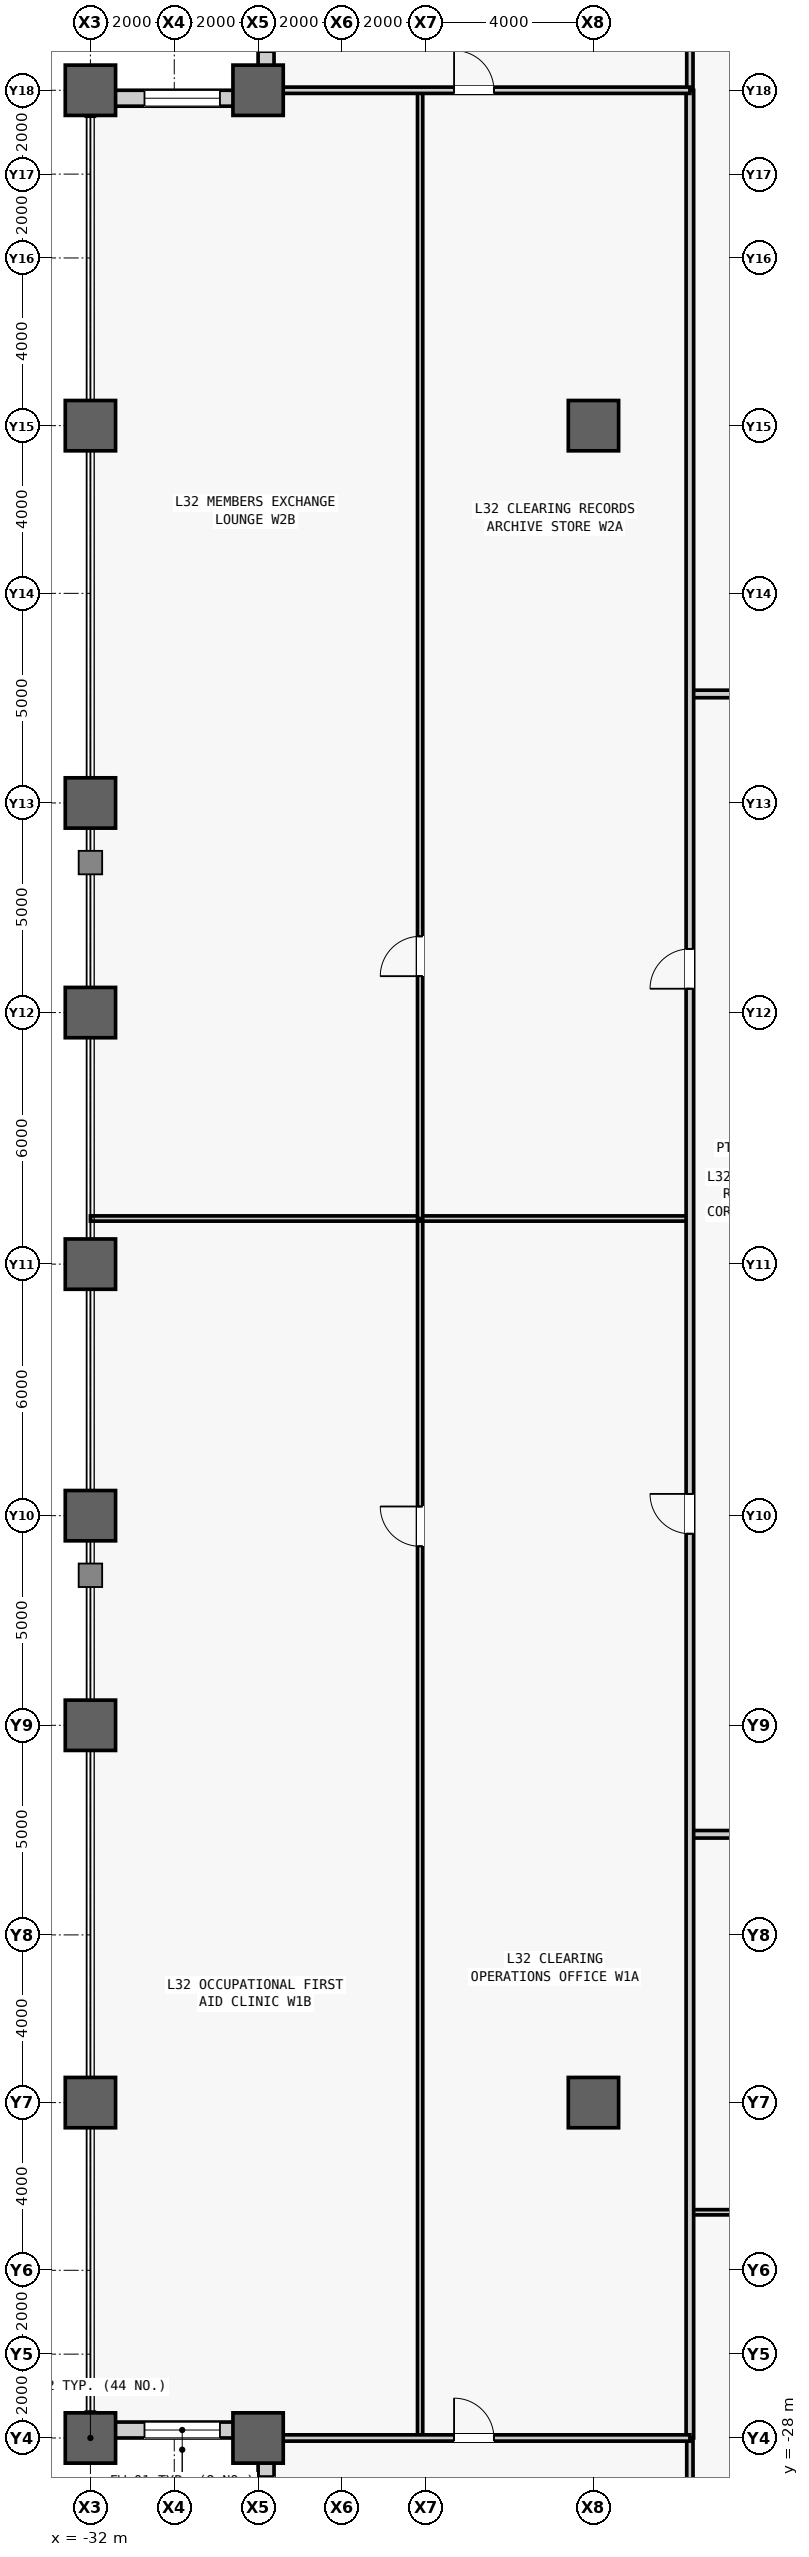
"""IFC4 building model, lengths in metres.
Left out: names, types, materials, properties, quantities, classifications, styles, units other than length and angle.
Written with IfcOpenShell. Run it as: python <this file> out.ifc"""

import sys

from ifc_helpers import new_model, si_unit, direction, frame, frame_2d, origin, origin_2d, place, context, subcontext, project, spatial, rectangle, hollow_rectangle, extrude, source, transform, mapped, element, fill, save


model = new_model("IFC4")
c1 = context("Model", 3, precision=1e-05, world=origin(), true_north=direction((0.0, 1.0)))
c2 = subcontext(c1, "Body", "Model", "MODEL_VIEW")
j1 = project(units=[si_unit("LENGTHUNIT", "METRE"), si_unit("PLANEANGLEUNIT", "RADIAN")], contexts=[c1])
p1 = place(None, origin())
s1 = spatial("IfcSite", under=j1, at=p1, CompositionType="ELEMENT")
p2 = place(p1, origin())
s2 = spatial("IfcBuilding", under=s1, at=p2, CompositionType="ELEMENT")
p3 = place(p2, frame((0.0, 0.0, 140.6)))
s3 = spatial("IfcBuildingStorey", under=s2, at=p3, CompositionType="ELEMENT", Elevation=140.6)
m1 = source(origin(), c2, "Body", "SweptSolid", [
    extrude(hollow_rectangle(XDim=1.2, YDim=1.2, WallThickness=0.07, at=origin_2d()), origin(), (0.0, 0.0, 1.0), 4.1),
])
for number, where, z_axis, x_axis in (
    (1, (-32.0, -28.0, 0.0), (0.0, 0.0, 1.0), (1.0, 0.0, 0.0)),
    (2, (-32.0, -20.0, 0.0), (0.0, 0.0, 1.0), (1.0, 0.0, 0.0)),
    (3, (-32.0, -11.0, 0.0), (0.0, 0.0, 1.0), (1.0, 0.0, 0.0)),
    (4, (-32.0, -6.0, 0.0), (0.0, 0.0, 1.0), (1.0, 0.0, 0.0)),
    (5, (-32.0, 0.0, 0.0), (0.0, 0.0, 1.0), (1.0, 0.0, 0.0)),
    (6, (-32.0, 6.0, 0.0), (0.0, 0.0, 1.0), (1.0, 0.0, 0.0)),
    (7, (-32.0, 11.0, 0.0), (0.0, 0.0, 1.0), (1.0, 0.0, 0.0)),
    (8, (-32.0, 20.0, 0.0), (0.0, 0.0, 1.0), (1.0, 0.0, 0.0)),
    (9, (-32.0, 28.0, 0.0), (0.0, 0.0, 1.0), (1.0, 0.0, 0.0)),
    (10, (-28.0, -28.0, 0.0), (0.0, 0.0, 1.0), (1.0, 0.0, 0.0)),
    (11, (-28.0, 28.0, 0.0), (0.0, 0.0, 1.0), (1.0, 0.0, 0.0)),
    (12, (-20.0, -20.0, 0.0), (0.0, 0.0, 1.0), (1.0, 0.0, 0.0)),
    (13, (-20.0, 20.0, 0.0), (0.0, 0.0, 1.0), (1.0, 0.0, 0.0)),
):
    element("IfcColumn", number, at=place(p3, frame(where, z_axis=z_axis, x_axis=x_axis)), inside=s3, PredefinedType="COLUMN", context=c2, shape_type="MappedRepresentation", body=[
        mapped(m1, transform((0.0, 0.0, 0.0), scale=1.0)),
    ])
m2 = source(origin(), c2, "Body", "SweptSolid", [
    extrude(rectangle(XDim=3.62, YDim=0.38, at=frame_2d((1.81, 0.0))), origin(), (0.0, 0.0, 1.0), 3.145),
])
p4 = place(p3, frame((-28.0, -27.81, 0.0), z_axis=(0.0, 0.0, 1.0), x_axis=(-1.0, 0.0, 0.0)))
e14 = element("IfcWall", 14, at=p4, inside=s3, PredefinedType="STANDARD", context=c2, shape_type="MappedRepresentation", body=[
    mapped(m2, transform((0.0, 0.0, 0.0), scale=1.0)),
])
m3 = source(origin(), c2, "Body", "SweptSolid", [
    extrude(rectangle(XDim=1.8, YDim=2.4, at=frame_2d((0.9, 1.2))), frame((0.0, 0.2, 0.0), z_axis=(0.0, -1.0, 0.0), x_axis=(1.0, 0.0, 0.0)), (0.0, 0.0, 1.0), 0.4),
])
p5 = place(p4, frame((0.91, 0.0, 0.5)))
e15 = element("IfcOpeningElement", 15, at=p5, cuts=e14, PredefinedType="OPENING", context=c2, shape_type="MappedRepresentation", body=[
    mapped(m3, transform((0.0, 0.0, 0.0), scale=1.0)),
])
p6 = place(p3, frame((-27.81, -31.62, 0.0), z_axis=(0.0, 0.0, 1.0), x_axis=(0.0, 1.0, 0.0)))
e16 = element("IfcWall", 16, at=p6, inside=s3, PredefinedType="STANDARD", context=c2, shape_type="MappedRepresentation", body=[
    mapped(m2, transform((0.0, 0.0, 0.0), scale=1.0)),
])
p7 = place(p6, frame((0.91, 0.0, 0.5)))
e17 = element("IfcOpeningElement", 17, at=p7, cuts=e16, PredefinedType="OPENING", context=c2, shape_type="MappedRepresentation", body=[
    mapped(m3, transform((0.0, 0.0, 0.0), scale=1.0)),
])
p8 = place(p3, frame((-27.81, 28.0, 0.0), z_axis=(0.0, 0.0, 1.0), x_axis=(0.0, 1.0, 0.0)))
e18 = element("IfcWall", 18, at=p8, inside=s3, PredefinedType="STANDARD", context=c2, shape_type="MappedRepresentation", body=[
    mapped(m2, transform((0.0, 0.0, 0.0), scale=1.0)),
])
p9 = place(p8, frame((0.91, 0.0, 0.5)))
e19 = element("IfcOpeningElement", 19, at=p9, cuts=e18, PredefinedType="OPENING", context=c2, shape_type="MappedRepresentation", body=[
    mapped(m3, transform((0.0, 0.0, 0.0), scale=1.0)),
])
p10 = place(p3, frame((-28.0, 27.81, 0.0), z_axis=(0.0, 0.0, 1.0), x_axis=(-1.0, 0.0, 0.0)))
e20 = element("IfcWall", 20, at=p10, inside=s3, PredefinedType="STANDARD", context=c2, shape_type="MappedRepresentation", body=[
    mapped(m2, transform((0.0, 0.0, 0.0), scale=1.0)),
])
p11 = place(p10, frame((0.91, 0.0, 0.5)))
e21 = element("IfcOpeningElement", 21, at=p11, cuts=e20, PredefinedType="OPENING", context=c2, shape_type="MappedRepresentation", body=[
    mapped(m3, transform((0.0, 0.0, 0.0), scale=1.0)),
])
m4 = source(origin(), c2, "Body", "SweptSolid", [
    extrude(rectangle(XDim=15.95, YDim=0.125, at=frame_2d((7.975, 0.0))), origin(), (0.0, 0.0, 1.0), 3.84),
])
p12 = place(p3, frame((-17.7, -22.616, 0.0), z_axis=(0.0, 0.0, 1.0), x_axis=(1.0, 0.0, 0.0)))
e22 = element("IfcWall", 22, at=p12, inside=s3, PredefinedType="PARTITIONING", context=c2, shape_type="MappedRepresentation", body=[
    mapped(m4, transform((0.0, 0.0, 0.0), scale=1.0)),
])
m5 = source(origin(), c2, "Body", "SweptSolid", [
    extrude(rectangle(XDim=0.95, YDim=2.15, at=frame_2d((0.475, 1.075))), frame((0.0, 0.073, 0.0), z_axis=(0.0, -1.0, 0.0), x_axis=(1.0, 0.0, 0.0)), (0.0, 0.0, 1.0), 0.145),
])
p13 = place(p12, frame((7.5, 0.0, 0.0)))
e23 = element("IfcOpeningElement", 23, at=p13, cuts=e22, PredefinedType="OPENING", context=c2, shape_type="MappedRepresentation", body=[
    mapped(m5, transform((0.0, 0.0, 0.0), scale=1.0)),
])
m6 = source(origin(), c2, "Body", "SweptSolid", [
    extrude(rectangle(XDim=36.25, YDim=0.18, at=frame_2d((18.125, 0.0))), origin(), (0.0, 0.0, 1.0), 3.84),
])
p14 = place(p3, frame((-17.7, -13.6, 0.0), z_axis=(0.0, 0.0, 1.0), x_axis=(1.0, 0.0, 0.0)))
e24 = element("IfcWall", 24, at=p14, inside=s3, PredefinedType="PARTITIONING", context=c2, shape_type="MappedRepresentation", body=[
    mapped(m6, transform((0.0, 0.0, 0.0), scale=1.0)),
])
m7 = source(origin(), c2, "Body", "SweptSolid", [
    extrude(rectangle(XDim=1.05, YDim=2.2, at=frame_2d((0.525, 1.1))), frame((0.0, 0.1, 0.0), z_axis=(0.0, -1.0, 0.0), x_axis=(1.0, 0.0, 0.0)), (0.0, 0.0, 1.0), 0.2),
])
p15 = place(p14, frame((9.1, 0.0, 0.0)))
e25 = element("IfcOpeningElement", 25, at=p15, cuts=e24, PredefinedType="OPENING", context=c2, shape_type="MappedRepresentation", body=[
    mapped(m7, transform((0.0, 0.0, 0.0), scale=1.0)),
])
p16 = place(p14, frame((23.5, 0.0, 0.0)))
e26 = element("IfcOpeningElement", 26, at=p16, cuts=e24, PredefinedType="OPENING", context=c2, shape_type="MappedRepresentation", body=[
    mapped(m7, transform((0.0, 0.0, 0.0), scale=1.0)),
])
p17 = place(p3, frame((-17.7, 13.6, 0.0), z_axis=(0.0, 0.0, 1.0), x_axis=(1.0, 0.0, 0.0)))
e27 = element("IfcWall", 27, at=p17, inside=s3, PredefinedType="PARTITIONING", context=c2, shape_type="MappedRepresentation", body=[
    mapped(m6, transform((0.0, 0.0, 0.0), scale=1.0)),
])
p18 = place(p17, frame((4.387, 0.0, 0.0)))
e28 = element("IfcOpeningElement", 28, at=p18, cuts=e27, PredefinedType="OPENING", context=c2, shape_type="MappedRepresentation", body=[
    mapped(m7, transform((0.0, 0.0, 0.0), scale=1.0)),
])
p19 = place(p17, frame((9.625, 0.0, 0.0)))
e29 = element("IfcOpeningElement", 29, at=p19, cuts=e27, PredefinedType="OPENING", context=c2, shape_type="MappedRepresentation", body=[
    mapped(m7, transform((0.0, 0.0, 0.0), scale=1.0)),
])
p20 = place(p17, frame((17.6, 0.0, 0.0)))
e30 = element("IfcOpeningElement", 30, at=p20, cuts=e27, PredefinedType="OPENING", context=c2, shape_type="MappedRepresentation", body=[
    mapped(m7, transform((0.0, 0.0, 0.0), scale=1.0)),
])
p21 = place(p17, frame((25.938, 0.0, 0.0)))
e31 = element("IfcOpeningElement", 31, at=p21, cuts=e27, PredefinedType="OPENING", context=c2, shape_type="MappedRepresentation", body=[
    mapped(m7, transform((0.0, 0.0, 0.0), scale=1.0)),
])
p22 = place(p17, frame((30.75, 0.0, 0.0)))
e32 = element("IfcOpeningElement", 32, at=p22, cuts=e27, PredefinedType="OPENING", context=c2, shape_type="MappedRepresentation", body=[
    mapped(m7, transform((0.0, 0.0, 0.0), scale=1.0)),
])
m8 = source(origin(), c2, "Body", "SweptSolid", [
    extrude(rectangle(XDim=4.0, YDim=0.15, at=frame_2d((2.0, 0.0))), origin(), (0.0, 0.0, 1.0), 3.84),
])
for number, where, z_axis, x_axis in (
    (33, (-17.7, -32.0, 0.0), (0.0, 0.0, 1.0), (0.0, 1.0, 0.0)),
    (34, (-17.7, 28.0, 0.0), (0.0, 0.0, 1.0), (0.0, 1.0, 0.0)),
):
    element("IfcWall", number, at=place(p3, frame(where, z_axis=z_axis, x_axis=x_axis)), inside=s3, PredefinedType="PARTITIONING", context=c2, shape_type="MappedRepresentation", body=[
        mapped(m8, transform((0.0, 0.0, 0.0), scale=1.0)),
    ])
m9 = source(origin(), c2, "Body", "SweptSolid", [
    extrude(rectangle(XDim=29.088, YDim=0.125, at=frame_2d((14.544, 0.0))), origin(), (0.0, 0.0, 1.0), 3.84),
])
p23 = place(p3, frame((-24.135, -28.0, 0.0), z_axis=(0.0, 0.0, 1.0), x_axis=(0.0, 1.0, 0.0)))
e35 = element("IfcWall", 35, at=p23, inside=s3, PredefinedType="PARTITIONING", context=c2, shape_type="MappedRepresentation", body=[
    mapped(m9, transform((0.0, 0.0, 0.0), scale=1.0)),
])
p24 = place(p23, frame((21.269, 0.0, 0.0)))
e36 = element("IfcOpeningElement", 36, at=p24, cuts=e35, PredefinedType="OPENING", context=c2, shape_type="MappedRepresentation", body=[
    mapped(m5, transform((0.0, 0.0, 0.0), scale=1.0)),
])
m10 = source(origin(), c2, "Body", "SweptSolid", [
    extrude(rectangle(XDim=14.3, YDim=0.125, at=frame_2d((7.15, 0.0))), origin(), (0.0, 0.0, 1.0), 3.84),
])
p25 = place(p3, frame((-32.0, 1.088, 0.0), z_axis=(0.0, 0.0, 1.0), x_axis=(1.0, 0.0, 0.0)))
e37 = element("IfcWall", 37, at=p25, inside=s3, PredefinedType="PARTITIONING", context=c2, shape_type="MappedRepresentation", body=[
    mapped(m10, transform((0.0, 0.0, 0.0), scale=1.0)),
])
m11 = source(origin(), c2, "Body", "SweptSolid", [
    extrude(rectangle(XDim=26.912, YDim=0.125, at=frame_2d((13.456, 0.0))), origin(), (0.0, 0.0, 1.0), 3.84),
])
p26 = place(p3, frame((-24.135, 1.088, 0.0), z_axis=(0.0, 0.0, 1.0), x_axis=(0.0, 1.0, 0.0)))
e38 = element("IfcWall", 38, at=p26, inside=s3, PredefinedType="PARTITIONING", context=c2, shape_type="MappedRepresentation", body=[
    mapped(m11, transform((0.0, 0.0, 0.0), scale=1.0)),
])
p27 = place(p26, frame((5.781, 0.0, 0.0)))
e39 = element("IfcOpeningElement", 39, at=p27, cuts=e38, PredefinedType="OPENING", context=c2, shape_type="MappedRepresentation", body=[
    mapped(m5, transform((0.0, 0.0, 0.0), scale=1.0)),
])
m12 = source(origin(), c2, "Body", "SweptSolid", [
    extrude(rectangle(XDim=56.0, YDim=0.18, at=frame_2d((28.0, 0.0))), origin(), (0.0, 0.0, 1.0), 3.84),
])
p28 = place(p3, frame((-17.7, -28.0, 0.0), z_axis=(0.0, 0.0, 1.0), x_axis=(0.0, 1.0, 0.0)))
e40 = element("IfcWall", 40, at=p28, inside=s3, PredefinedType="PARTITIONING", context=c2, shape_type="MappedRepresentation", body=[
    mapped(m12, transform((0.0, 0.0, 0.0), scale=1.0)),
])
m13 = source(origin(), c2, "Body", "SweptSolid", [
    extrude(rectangle(XDim=0.95, YDim=2.15, at=frame_2d((0.475, 1.075))), frame((0.0, 0.1, 0.0), z_axis=(0.0, -1.0, 0.0), x_axis=(1.0, 0.0, 0.0)), (0.0, 0.0, 1.0), 0.2),
])
p29 = place(p28, frame((21.569, 0.0, 0.0)))
e41 = element("IfcOpeningElement", 41, at=p29, cuts=e40, PredefinedType="OPENING", context=c2, shape_type="MappedRepresentation", body=[
    mapped(m13, transform((0.0, 0.0, 0.0), scale=1.0)),
])
p30 = place(p28, frame((34.569, 0.0, 0.0)))
e42 = element("IfcOpeningElement", 42, at=p30, cuts=e40, PredefinedType="OPENING", context=c2, shape_type="MappedRepresentation", body=[
    mapped(m13, transform((0.0, 0.0, 0.0), scale=1.0)),
])
m14 = source(origin(), c2, "Body", "SweptSolid", [
    extrude(rectangle(XDim=10.3, YDim=0.15, at=frame_2d((5.15, 0.0))), origin(), (0.0, 0.0, 1.0), 3.84),
])
p31 = place(p3, frame((-28.0, -28.0, 0.0), z_axis=(0.0, 0.0, 1.0), x_axis=(1.0, 0.0, 0.0)))
e43 = element("IfcWall", 43, at=p31, inside=s3, PredefinedType="PARTITIONING", context=c2, shape_type="MappedRepresentation", body=[
    mapped(m14, transform((0.0, 0.0, 0.0), scale=1.0)),
])
m15 = source(origin(), c2, "Body", "SweptSolid", [
    extrude(rectangle(XDim=0.95, YDim=2.15, at=frame_2d((0.475, 1.075))), frame((0.0, 0.085, 0.0), z_axis=(0.0, -1.0, 0.0), x_axis=(1.0, 0.0, 0.0)), (0.0, 0.0, 1.0), 0.17),
])
p32 = place(p31, frame((4.675, 0.0, 0.0)))
e44 = element("IfcOpeningElement", 44, at=p32, cuts=e43, PredefinedType="OPENING", context=c2, shape_type="MappedRepresentation", body=[
    mapped(m15, transform((0.0, 0.0, 0.0), scale=1.0)),
])
p33 = place(p3, frame((-28.0, 28.0, 0.0), z_axis=(0.0, 0.0, 1.0), x_axis=(1.0, 0.0, 0.0)))
e45 = element("IfcWall", 45, at=p33, inside=s3, PredefinedType="PARTITIONING", context=c2, shape_type="MappedRepresentation", body=[
    mapped(m14, transform((0.0, 0.0, 0.0), scale=1.0)),
])
p34 = place(p33, frame((4.675, 0.0, 0.0)))
e46 = element("IfcOpeningElement", 46, at=p34, cuts=e45, PredefinedType="OPENING", context=c2, shape_type="MappedRepresentation", body=[
    mapped(m15, transform((0.0, 0.0, 0.0), scale=1.0)),
])
m16 = source(origin(), c2, "Body", "SweptSolid", [
    extrude(rectangle(XDim=1.8, YDim=2.4, at=frame_2d((0.9, 1.2))), frame((0.0, 0.03, 0.0), z_axis=(0.0, -1.0, 0.0), x_axis=(1.0, 0.0, 0.0)), (0.0, 0.0, 1.0), 0.06),
])
p35 = place(p5, origin())
e47 = element("IfcWindow", 47, at=p35, inside=s3, PartitioningType="SINGLE_PANEL", PredefinedType="WINDOW", context=c2, shape_type="MappedRepresentation", body=[
    mapped(m16, transform((0.0, 0.0, 0.0), scale=1.0)),
])
fill(e15, e47)
p36 = place(p7, origin())
e48 = element("IfcWindow", 48, at=p36, inside=s3, PartitioningType="SINGLE_PANEL", PredefinedType="WINDOW", context=c2, shape_type="MappedRepresentation", body=[
    mapped(m16, transform((0.0, 0.0, 0.0), scale=1.0)),
])
fill(e17, e48)
p37 = place(p9, origin())
e49 = element("IfcWindow", 49, at=p37, inside=s3, PartitioningType="SINGLE_PANEL", PredefinedType="WINDOW", context=c2, shape_type="MappedRepresentation", body=[
    mapped(m16, transform((0.0, 0.0, 0.0), scale=1.0)),
])
fill(e19, e49)
p38 = place(p11, origin())
e50 = element("IfcWindow", 50, at=p38, inside=s3, PartitioningType="SINGLE_PANEL", PredefinedType="WINDOW", context=c2, shape_type="MappedRepresentation", body=[
    mapped(m16, transform((0.0, 0.0, 0.0), scale=1.0)),
])
fill(e21, e50)
m17 = source(origin(), c2, "Body", "SweptSolid", [
    extrude(rectangle(XDim=0.95, YDim=2.15, at=frame_2d((0.475, 1.075))), frame((0.0, 0.025, 0.0), z_axis=(0.0, -1.0, 0.0), x_axis=(1.0, 0.0, 0.0)), (0.0, 0.0, 1.0), 0.05),
])
p39 = place(p24, origin())
e51 = element("IfcDoor", 51, at=p39, inside=s3, OperationType="SINGLE_SWING_RIGHT", PredefinedType="DOOR", context=c2, shape_type="MappedRepresentation", body=[
    mapped(m17, transform((0.0, 0.0, 0.0), scale=1.0)),
])
fill(e36, e51)
p40 = place(p27, origin())
e52 = element("IfcDoor", 52, at=p40, inside=s3, OperationType="SINGLE_SWING_LEFT", PredefinedType="DOOR", context=c2, shape_type="MappedRepresentation", body=[
    mapped(m17, transform((0.0, 0.0, 0.0), scale=1.0)),
])
fill(e39, e52)
p41 = place(p29, origin())
e53 = element("IfcDoor", 53, at=p41, inside=s3, OperationType="SINGLE_SWING_RIGHT", PredefinedType="DOOR", context=c2, shape_type="MappedRepresentation", body=[
    mapped(m17, transform((0.0, 0.0, 0.0), scale=1.0)),
])
fill(e41, e53)
p42 = place(p30, origin())
e54 = element("IfcDoor", 54, at=p42, inside=s3, OperationType="SINGLE_SWING_LEFT", PredefinedType="DOOR", context=c2, shape_type="MappedRepresentation", body=[
    mapped(m17, transform((0.0, 0.0, 0.0), scale=1.0)),
])
fill(e42, e54)
p43 = place(p32, origin())
e55 = element("IfcDoor", 55, at=p43, inside=s3, OperationType="SINGLE_SWING_LEFT", PredefinedType="DOOR", context=c2, shape_type="MappedRepresentation", body=[
    mapped(m17, transform((0.0, 0.0, 0.0), scale=1.0)),
])
fill(e44, e55)
p44 = place(p34, origin())
e56 = element("IfcDoor", 56, at=p44, inside=s3, OperationType="SINGLE_SWING_LEFT", PredefinedType="DOOR", context=c2, shape_type="MappedRepresentation", body=[
    mapped(m17, transform((0.0, 0.0, 0.0), scale=1.0)),
])
fill(e46, e56)
save(model, sys.argv[1])
